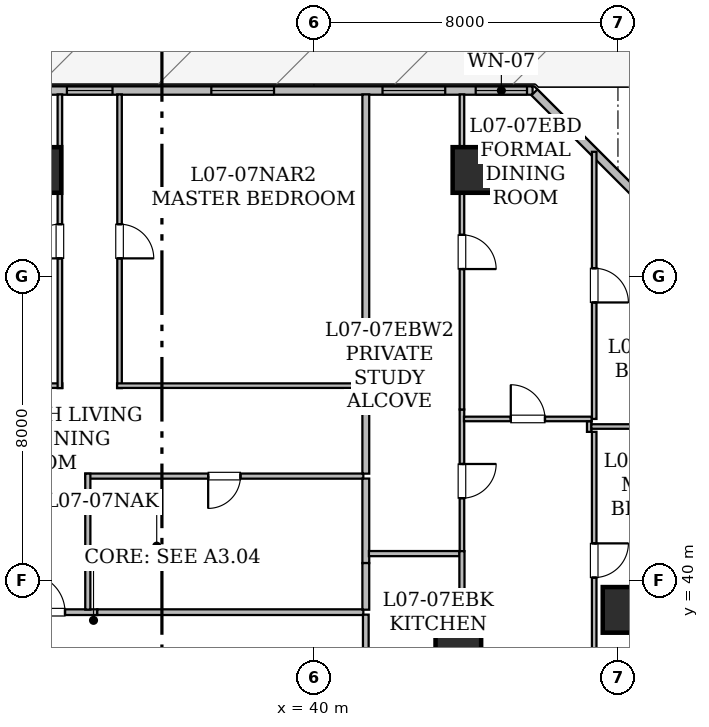
"""IFC4 building model, lengths in metres.
Left out: names, types, materials, properties, quantities, classifications, styles, units other than length and angle.
Written with IfcOpenShell. Run it as: python <this file> out.ifc"""

import sys

from ifc_helpers import new_model, si_unit, direction, frame, frame_2d, origin, origin_2d, place, context, subcontext, project, spatial, rectangle, hollow_rectangle, extrude, element, fill, save


model = new_model("IFC4")
c1 = context("Model", 3, precision=1e-05, world=origin(), true_north=direction((0.0, 1.0)))
c2 = subcontext(c1, "Body", "Model", "MODEL_VIEW")
j1 = project(units=[si_unit("LENGTHUNIT", "METRE"), si_unit("PLANEANGLEUNIT", "RADIAN")], contexts=[c1])
p1 = place(None, origin())
s1 = spatial("IfcSite", under=j1, at=p1, CompositionType="ELEMENT")
p2 = place(p1, origin())
s2 = spatial("IfcBuilding", under=s1, at=p2, CompositionType="ELEMENT")
p3 = place(p2, frame((0.0, 0.0, 33.3)))
s3 = spatial("IfcBuildingStorey", under=s2, at=p3, CompositionType="ELEMENT", Elevation=33.3)
for number, where, z_axis, x_axis in (
    (1, (32.75, 50.8, 0.025), (0.0, 0.0, 1.0), (1.0, 0.0, 0.0)),
    (2, (44.25, 50.8, 0.025), (0.0, 0.0, 1.0), (1.0, 0.0, 0.0)),
    (3, (48.2, 39.225, 0.025), (0.0, 0.0, 1.0), (1.0, 0.0, 0.0)),
    (4, (43.8, 38.2, 0.025), (0.0, 0.0, 1.0), (1.0, 0.0, 0.0)),
):
    element("IfcColumn", number, at=place(p3, frame(where, z_axis=z_axis, x_axis=x_axis)), inside=s3, PredefinedType="COLUMN", context=c2, shape_type="SweptSolid", body=[
        extrude(hollow_rectangle(XDim=1.2, YDim=1.2, WallThickness=0.06, at=origin_2d()), origin(), (0.0, 0.0, 1.0), 3.625),
    ])
p4 = place(p3, frame((8.315, 52.89, 0.0), z_axis=(0.0, 0.0, 1.0), x_axis=(1.0, 0.0, 0.0)))
e5 = element("IfcWall", 5, at=p4, inside=s3, PredefinedType="STANDARD", context=c2, shape_type="SweptSolid", body=[
    extrude(rectangle(XDim=37.439, YDim=0.22, at=frame_2d((18.719, 0.0))), origin(), (0.0, 0.0, 1.0), 3.43),
])
p5 = place(p4, frame((19.779, 0.0, 0.0)))
e6 = element("IfcOpeningElement", 6, at=p5, cuts=e5, PredefinedType="OPENING", context=c2, shape_type="SweptSolid", body=[
    extrude(rectangle(XDim=1.0, YDim=2.15, at=frame_2d((0.5, 1.075))), frame((0.0, 0.12, 0.0), z_axis=(0.0, -1.0, 0.0), x_axis=(1.0, 0.0, 0.0)), (0.0, 0.0, 1.0), 0.24),
])
p6 = place(p4, frame((4.524, 0.0, 0.85)))
e7 = element("IfcOpeningElement", 7, at=p6, cuts=e5, PredefinedType="OPENING", context=c2, shape_type="SweptSolid", body=[
    extrude(rectangle(XDim=1.65, YDim=1.55, at=frame_2d((0.825, 0.775))), frame((0.0, 0.12, 0.0), z_axis=(0.0, -1.0, 0.0), x_axis=(1.0, 0.0, 0.0)), (0.0, 0.0, 1.0), 0.24),
])
p7 = place(p4, frame((16.273, 0.0, 0.85)))
e8 = element("IfcOpeningElement", 8, at=p7, cuts=e5, PredefinedType="OPENING", context=c2, shape_type="SweptSolid", body=[
    extrude(rectangle(XDim=1.65, YDim=1.55, at=frame_2d((0.825, 0.775))), frame((0.0, 0.12, 0.0), z_axis=(0.0, -1.0, 0.0), x_axis=(1.0, 0.0, 0.0)), (0.0, 0.0, 1.0), 0.24),
])
p8 = place(p4, frame((14.285, 0.0, 0.8)))
e9 = element("IfcOpeningElement", 9, at=p8, cuts=e5, PredefinedType="OPENING", context=c2, shape_type="SweptSolid", body=[
    extrude(rectangle(XDim=1.2, YDim=1.5, at=frame_2d((0.6, 0.75))), frame((0.0, 0.12, 0.0), z_axis=(0.0, -1.0, 0.0), x_axis=(1.0, 0.0, 0.0)), (0.0, 0.0, 1.0), 0.24),
])
p9 = place(p4, frame((10.238, 0.0, 0.85)))
e10 = element("IfcOpeningElement", 10, at=p9, cuts=e5, PredefinedType="OPENING", context=c2, shape_type="SweptSolid", body=[
    extrude(rectangle(XDim=1.65, YDim=1.55, at=frame_2d((0.825, 0.775))), frame((0.0, 0.12, 0.0), z_axis=(0.0, -1.0, 0.0), x_axis=(1.0, 0.0, 0.0)), (0.0, 0.0, 1.0), 0.24),
])
p10 = place(p4, frame((25.185, 0.0, 0.8)))
e11 = element("IfcOpeningElement", 11, at=p10, cuts=e5, PredefinedType="OPENING", context=c2, shape_type="SweptSolid", body=[
    extrude(rectangle(XDim=1.2, YDim=1.5, at=frame_2d((0.6, 0.75))), frame((0.0, 0.12, 0.0), z_axis=(0.0, -1.0, 0.0), x_axis=(1.0, 0.0, 0.0)), (0.0, 0.0, 1.0), 0.24),
])
p11 = place(p4, frame((28.985, 0.0, 0.85)))
e12 = element("IfcOpeningElement", 12, at=p11, cuts=e5, PredefinedType="OPENING", context=c2, shape_type="SweptSolid", body=[
    extrude(rectangle(XDim=1.65, YDim=1.55, at=frame_2d((0.825, 0.775))), frame((0.0, 0.12, 0.0), z_axis=(0.0, -1.0, 0.0), x_axis=(1.0, 0.0, 0.0)), (0.0, 0.0, 1.0), 0.24),
])
p12 = place(p4, frame((33.49, 0.0, 0.85)))
e13 = element("IfcOpeningElement", 13, at=p12, cuts=e5, PredefinedType="OPENING", context=c2, shape_type="SweptSolid", body=[
    extrude(rectangle(XDim=1.65, YDim=1.55, at=frame_2d((0.825, 0.775))), frame((0.0, 0.12, 0.0), z_axis=(0.0, -1.0, 0.0), x_axis=(1.0, 0.0, 0.0)), (0.0, 0.0, 1.0), 0.24),
])
p13 = place(p4, frame((35.942, 0.0, 0.85)))
e14 = element("IfcOpeningElement", 14, at=p13, cuts=e5, PredefinedType="OPENING", context=c2, shape_type="SweptSolid", body=[
    extrude(rectangle(XDim=1.35, YDim=1.5, at=frame_2d((0.675, 0.75))), frame((0.0, 0.12, 0.0), z_axis=(0.0, -1.0, 0.0), x_axis=(1.0, 0.0, 0.0)), (0.0, 0.0, 1.0), 0.24),
])
p14 = place(p3, frame((45.802, 52.842, 0.0), z_axis=(0.0, 0.0, 1.0), x_axis=(0.707085666273, -0.70712789547, 0.0)))
e15 = element("IfcWall", 15, at=p14, inside=s3, PredefinedType="STANDARD", context=c2, shape_type="SweptSolid", body=[
    extrude(rectangle(XDim=5.781, YDim=0.22, at=frame_2d((2.891, 0.0))), origin(), (0.0, 0.0, 1.0), 3.43),
])
p15 = place(p3, frame((31.601, 39.165, 0.0), z_axis=(0.0, 0.0, 1.0), x_axis=(1.0, 0.0, 0.0)))
e16 = element("IfcWall", 16, at=p15, inside=s3, PredefinedType="STANDARD", context=c2, shape_type="SweptSolid", body=[
    extrude(rectangle(XDim=2.698, YDim=0.15, at=frame_2d((1.349, 0.0))), origin(), (0.0, 0.0, 1.0), 3.43),
])
p16 = place(p15, frame((0.849, 0.0, 0.0)))
e17 = element("IfcOpeningElement", 17, at=p16, cuts=e16, PredefinedType="OPENING", context=c2, shape_type="SweptSolid", body=[
    extrude(rectangle(XDim=1.0, YDim=2.15, at=frame_2d((0.5, 1.075))), frame((0.0, 0.085, 0.0), z_axis=(0.0, -1.0, 0.0), x_axis=(1.0, 0.0, 0.0)), (0.0, 0.0, 1.0), 0.17),
])
p17 = place(p3, frame((34.299, 39.165, 0.0), z_axis=(0.0, 0.0, 1.0), x_axis=(1.0, 0.0, 0.0)))
e18 = element("IfcWall", 18, at=p17, inside=s3, PredefinedType="STANDARD", context=c2, shape_type="SweptSolid", body=[
    extrude(rectangle(XDim=7.001, YDim=0.15, at=frame_2d((3.5, 0.0))), origin(), (0.0, 0.0, 1.0), 3.43),
])
p18 = place(p3, frame((41.365, 39.1, 0.0), z_axis=(0.0, 0.0, 1.0), x_axis=(0.0, -1.0, 0.0)))
e19 = element("IfcWall", 19, at=p18, inside=s3, PredefinedType="STANDARD", context=c2, shape_type="SweptSolid", body=[
    extrude(rectangle(XDim=3.11, YDim=0.15, at=frame_2d((1.555, 0.0))), origin(), (0.0, 0.0, 1.0), 2.647),
])
p19 = place(p3, frame((41.3, 42.745, 0.0), z_axis=(0.0, 0.0, 1.0), x_axis=(-1.0, 0.0, 0.0)))
e20 = element("IfcWall", 20, at=p19, inside=s3, PredefinedType="PARTITIONING", context=c2, shape_type="SweptSolid", body=[
    extrude(rectangle(XDim=7.315, YDim=0.135, at=frame_2d((3.657, 0.0))), origin(), (0.0, 0.0, 1.0), 2.957),
])
p20 = place(p19, frame((3.233, 0.0, 0.0)))
e21 = element("IfcOpeningElement", 21, at=p20, cuts=e20, PredefinedType="OPENING", context=c2, shape_type="SweptSolid", body=[
    extrude(rectangle(XDim=0.85, YDim=2.1, at=frame_2d((0.425, 1.05))), frame((0.0, 0.077, 0.0), z_axis=(0.0, -1.0, 0.0), x_axis=(1.0, 0.0, 0.0)), (0.0, 0.0, 1.0), 0.155),
])
p21 = place(p3, frame((34.05, 42.81, 0.0), z_axis=(0.0, 0.0, 1.0), x_axis=(0.0, -1.0, 0.0)))
e22 = element("IfcWall", 22, at=p21, inside=s3, PredefinedType="PARTITIONING", context=c2, shape_type="SweptSolid", body=[
    extrude(rectangle(XDim=3.578, YDim=0.135, at=frame_2d((1.789, 0.0))), origin(), (0.0, 0.0, 1.0), 2.957),
])
p22 = place(p3, frame((26.917, 45.125, 0.0), z_axis=(0.0, 0.0, 1.0), x_axis=(1.0, 0.0, 0.0)))
e23 = element("IfcWall", 23, at=p22, inside=s3, PredefinedType="PARTITIONING", context=c2, shape_type="SweptSolid", body=[
    extrude(rectangle(XDim=6.463, YDim=0.12, at=frame_2d((3.231, 0.0))), origin(), (0.0, 0.0, 1.0), 2.647),
])
p23 = place(p3, frame((33.315, 45.06, 0.0), z_axis=(0.0, 0.0, 1.0), x_axis=(0.0, 1.0, 0.0)))
e24 = element("IfcWall", 24, at=p23, inside=s3, PredefinedType="PARTITIONING", context=c2, shape_type="SweptSolid", body=[
    extrude(rectangle(XDim=7.728, YDim=0.12, at=frame_2d((3.864, 0.0))), origin(), (0.0, 0.0, 1.0), 2.803),
])
p24 = place(p23, frame((3.414, 0.0, 0.0)))
e25 = element("IfcOpeningElement", 25, at=p24, cuts=e24, PredefinedType="OPENING", context=c2, shape_type="SweptSolid", body=[
    extrude(rectangle(XDim=0.9, YDim=2.1, at=frame_2d((0.45, 1.05))), frame((0.0, 0.07, 0.0), z_axis=(0.0, -1.0, 0.0), x_axis=(1.0, 0.0, 0.0)), (0.0, 0.0, 1.0), 0.14),
])
p25 = place(p3, frame((34.885, 52.788, 0.0), z_axis=(0.0, 0.0, 1.0), x_axis=(0.0, -1.0, 0.0)))
e26 = element("IfcWall", 26, at=p25, inside=s3, PredefinedType="PARTITIONING", context=c2, shape_type="SweptSolid", body=[
    extrude(rectangle(XDim=7.728, YDim=0.12, at=frame_2d((3.864, 0.0))), origin(), (0.0, 0.0, 1.0), 2.803),
])
p26 = place(p25, frame((3.414, 0.0, 0.0)))
e27 = element("IfcOpeningElement", 27, at=p26, cuts=e26, PredefinedType="OPENING", context=c2, shape_type="SweptSolid", body=[
    extrude(rectangle(XDim=0.9, YDim=2.1, at=frame_2d((0.45, 1.05))), frame((0.0, 0.07, 0.0), z_axis=(0.0, -1.0, 0.0), x_axis=(1.0, 0.0, 0.0)), (0.0, 0.0, 1.0), 0.14),
])
p27 = place(p3, frame((34.82, 45.125, 0.0), z_axis=(0.0, 0.0, 1.0), x_axis=(1.0, 0.0, 0.0)))
e28 = element("IfcWall", 28, at=p27, inside=s3, PredefinedType="PARTITIONING", context=c2, shape_type="SweptSolid", body=[
    extrude(rectangle(XDim=6.48, YDim=0.12, at=frame_2d((3.24, 0.0))), origin(), (0.0, 0.0, 1.0), 3.43),
])
p28 = place(p3, frame((41.365, 45.06, 0.0), z_axis=(0.0, 0.0, 1.0), x_axis=(0.0, -1.0, 0.0)))
e29 = element("IfcWall", 29, at=p28, inside=s3, PredefinedType="STANDARD", context=c2, shape_type="SweptSolid", body=[
    extrude(rectangle(XDim=2.25, YDim=0.18, at=frame_2d((1.125, 0.0))), origin(), (0.0, 0.0, 1.0), 3.43),
])
p29 = place(p3, frame((41.365, 42.68, 0.0), z_axis=(0.0, 0.0, 1.0), x_axis=(0.0, -1.0, 0.0)))
e30 = element("IfcWall", 30, at=p29, inside=s3, PredefinedType="STANDARD", context=c2, shape_type="SweptSolid", body=[
    extrude(rectangle(XDim=2.223, YDim=0.18, at=frame_2d((1.111, 0.0))), origin(), (0.0, 0.0, 1.0), 2.957),
])
p30 = place(p3, frame((41.365, 40.457, 0.0), z_axis=(0.0, 0.0, 1.0), x_axis=(0.0, -1.0, 0.0)))
e31 = element("IfcWall", 31, at=p30, inside=s3, PredefinedType="STANDARD", context=c2, shape_type="SweptSolid", body=[
    extrude(rectangle(XDim=1.227, YDim=0.18, at=frame_2d((0.614, 0.0))), origin(), (0.0, 0.0, 1.0), 3.43),
])
p31 = place(p3, frame((41.365, 52.788, 0.0), z_axis=(0.0, 0.0, 1.0), x_axis=(0.0, -1.0, 0.0)))
e32 = element("IfcWall", 32, at=p31, inside=s3, PredefinedType="STANDARD", context=c2, shape_type="SweptSolid", body=[
    extrude(rectangle(XDim=7.598, YDim=0.18, at=frame_2d((3.799, 0.0))), origin(), (0.0, 0.0, 1.0), 2.803),
])
p32 = place(p3, frame((43.895, 44.498, 0.0), z_axis=(0.0, 0.0, 1.0), x_axis=(0.0, -1.0, 0.0)))
e33 = element("IfcWall", 33, at=p32, inside=s3, PredefinedType="PARTITIONING", context=c2, shape_type="SweptSolid", body=[
    extrude(rectangle(XDim=3.727, YDim=0.12, at=frame_2d((1.864, 0.0))), origin(), (0.0, 0.0, 1.0), 2.647),
])
p33 = place(p32, frame((1.434, 0.0, 0.0)))
e34 = element("IfcOpeningElement", 34, at=p33, cuts=e33, PredefinedType="OPENING", context=c2, shape_type="SweptSolid", body=[
    extrude(rectangle(XDim=0.9, YDim=2.1, at=frame_2d((0.45, 1.05))), frame((0.0, 0.07, 0.0), z_axis=(0.0, -1.0, 0.0), x_axis=(1.0, 0.0, 0.0)), (0.0, 0.0, 1.0), 0.14),
])
p34 = place(p3, frame((43.895, 52.788, 0.0), z_axis=(0.0, 0.0, 1.0), x_axis=(0.0, -1.0, 0.0)))
e35 = element("IfcWall", 35, at=p34, inside=s3, PredefinedType="PARTITIONING", context=c2, shape_type="SweptSolid", body=[
    extrude(rectangle(XDim=8.29, YDim=0.12, at=frame_2d((4.145, 0.0))), origin(), (0.0, 0.0, 1.0), 2.647),
])
p35 = place(p34, frame((3.695, 0.0, 0.0)))
e36 = element("IfcOpeningElement", 36, at=p35, cuts=e35, PredefinedType="OPENING", context=c2, shape_type="SweptSolid", body=[
    extrude(rectangle(XDim=0.9, YDim=2.1, at=frame_2d((0.45, 1.05))), frame((0.0, 0.07, 0.0), z_axis=(0.0, -1.0, 0.0), x_axis=(1.0, 0.0, 0.0)), (0.0, 0.0, 1.0), 0.14),
])
p36 = place(p3, frame((43.83, 40.706, 0.0), z_axis=(0.0, 0.0, 1.0), x_axis=(-1.0, 0.0, 0.0)))
e37 = element("IfcWall", 37, at=p36, inside=s3, PredefinedType="PARTITIONING", context=c2, shape_type="SweptSolid", body=[
    extrude(rectangle(XDim=2.383, YDim=0.135, at=frame_2d((1.191, 0.0))), origin(), (0.0, 0.0, 1.0), 2.647),
])
p37 = place(p3, frame((43.949, 44.249, 0.0), z_axis=(0.0, 0.0, 1.0), x_axis=(1.0, 0.0, 0.0)))
e38 = element("IfcWall", 38, at=p37, inside=s3, PredefinedType="PARTITIONING", context=c2, shape_type="SweptSolid", body=[
    extrude(rectangle(XDim=3.361, YDim=0.12, at=frame_2d((1.681, 0.0))), origin(), (0.0, 0.0, 1.0), 2.647),
])
p38 = place(p37, frame((1.231, 0.0, 0.0)))
e39 = element("IfcOpeningElement", 39, at=p38, cuts=e38, PredefinedType="OPENING", context=c2, shape_type="SweptSolid", body=[
    extrude(rectangle(XDim=0.9, YDim=2.1, at=frame_2d((0.45, 1.05))), frame((0.0, 0.07, 0.0), z_axis=(0.0, -1.0, 0.0), x_axis=(1.0, 0.0, 0.0)), (0.0, 0.0, 1.0), 0.14),
])
p39 = place(p3, frame((47.245, 44.184, 0.0), z_axis=(0.0, 0.0, 1.0), x_axis=(0.0, -1.0, 0.0)))
e40 = element("IfcWall", 40, at=p39, inside=s3, PredefinedType="PARTITIONING", context=c2, shape_type="SweptSolid", body=[
    extrude(rectangle(XDim=0.275, YDim=0.12, at=frame_2d((0.138, 0.0))), origin(), (0.0, 0.0, 1.0), 3.43),
])
p40 = place(p3, frame((43.895, 35.676, 0.0), z_axis=(0.0, 0.0, 1.0), x_axis=(0.0, 1.0, 0.0)))
e41 = element("IfcWall", 41, at=p40, inside=s3, PredefinedType="PARTITIONING", context=c2, shape_type="SweptSolid", body=[
    extrude(rectangle(XDim=5.095, YDim=0.135, at=frame_2d((2.547, 0.0))), origin(), (0.0, 0.0, 1.0), 2.647),
])
p41 = place(p40, frame((0.857, 0.0, 0.0)))
e42 = element("IfcOpeningElement", 42, at=p41, cuts=e41, PredefinedType="OPENING", context=c2, shape_type="SweptSolid", body=[
    extrude(rectangle(XDim=0.85, YDim=2.1, at=frame_2d((0.425, 1.05))), frame((0.0, 0.077, 0.0), z_axis=(0.0, -1.0, 0.0), x_axis=(1.0, 0.0, 0.0)), (0.0, 0.0, 1.0), 0.155),
])
p42 = place(p3, frame((47.375, 43.909, 0.0), z_axis=(0.0, 0.0, 1.0), x_axis=(0.0, -1.0, 0.0)))
e43 = element("IfcWall", 43, at=p42, inside=s3, PredefinedType="PARTITIONING", context=c2, shape_type="SweptSolid", body=[
    extrude(rectangle(XDim=7.246, YDim=0.12, at=frame_2d((3.623, 0.0))), origin(), (0.0, 0.0, 1.0), 2.647),
])
p43 = place(p42, frame((2.934, 0.0, 0.0)))
e44 = element("IfcOpeningElement", 44, at=p43, cuts=e43, PredefinedType="OPENING", context=c2, shape_type="SweptSolid", body=[
    extrude(rectangle(XDim=0.9, YDim=2.1, at=frame_2d((0.45, 1.05))), frame((0.0, 0.07, 0.0), z_axis=(0.0, -1.0, 0.0), x_axis=(1.0, 0.0, 0.0)), (0.0, 0.0, 1.0), 0.14),
])
p44 = place(p3, frame((47.375, 51.278, 0.0), z_axis=(0.0, 0.0, 1.0), x_axis=(0.0, -1.0, 0.0)))
e45 = element("IfcWall", 45, at=p44, inside=s3, PredefinedType="PARTITIONING", context=c2, shape_type="SweptSolid", body=[
    extrude(rectangle(XDim=7.029, YDim=0.12, at=frame_2d((3.515, 0.0))), origin(), (0.0, 0.0, 1.0), 3.43),
])
p45 = place(p44, frame((3.064, 0.0, 0.0)))
e46 = element("IfcOpeningElement", 46, at=p45, cuts=e45, PredefinedType="OPENING", context=c2, shape_type="SweptSolid", body=[
    extrude(rectangle(XDim=0.9, YDim=2.1, at=frame_2d((0.45, 1.05))), frame((0.0, 0.07, 0.0), z_axis=(0.0, -1.0, 0.0), x_axis=(1.0, 0.0, 0.0)), (0.0, 0.0, 1.0), 0.14),
])
p46 = place(p3, frame((47.299, 44.05, 0.0), z_axis=(0.0, 0.0, 1.0), x_axis=(1.0, 0.0, 0.0)))
e47 = element("IfcWall", 47, at=p46, inside=s3, PredefinedType="PARTITIONING", context=c2, shape_type="SweptSolid", body=[
    extrude(rectangle(XDim=2.489, YDim=0.12, at=frame_2d((1.245, 0.0))), origin(), (0.0, 0.0, 1.0), 3.43),
])
p47 = place(p10, origin())
e48 = element("IfcWindow", 48, at=p47, inside=s3, PartitioningType="SINGLE_PANEL", PredefinedType="WINDOW", context=c2, shape_type="SweptSolid", body=[
    extrude(rectangle(XDim=1.2, YDim=1.5, at=frame_2d((0.6, 0.75))), frame((0.0, 0.03, 0.0), z_axis=(0.0, -1.0, 0.0), x_axis=(1.0, 0.0, 0.0)), (0.0, 0.0, 1.0), 0.06),
])
fill(e11, e48)
p48 = place(p11, origin())
e49 = element("IfcWindow", 49, at=p48, inside=s3, PartitioningType="SINGLE_PANEL", PredefinedType="WINDOW", context=c2, shape_type="SweptSolid", body=[
    extrude(rectangle(XDim=1.65, YDim=1.55, at=frame_2d((0.825, 0.775))), frame((0.0, 0.03, 0.0), z_axis=(0.0, -1.0, 0.0), x_axis=(1.0, 0.0, 0.0)), (0.0, 0.0, 1.0), 0.06),
])
fill(e12, e49)
p49 = place(p12, origin())
e50 = element("IfcWindow", 50, at=p49, inside=s3, PartitioningType="SINGLE_PANEL", PredefinedType="WINDOW", context=c2, shape_type="SweptSolid", body=[
    extrude(rectangle(XDim=1.65, YDim=1.55, at=frame_2d((0.825, 0.775))), frame((0.0, 0.03, 0.0), z_axis=(0.0, -1.0, 0.0), x_axis=(1.0, 0.0, 0.0)), (0.0, 0.0, 1.0), 0.06),
])
fill(e13, e50)
p50 = place(p13, origin())
e51 = element("IfcWindow", 51, at=p50, inside=s3, PartitioningType="SINGLE_PANEL", PredefinedType="WINDOW", context=c2, shape_type="SweptSolid", body=[
    extrude(rectangle(XDim=1.35, YDim=1.5, at=frame_2d((0.675, 0.75))), frame((0.0, 0.03, 0.0), z_axis=(0.0, -1.0, 0.0), x_axis=(1.0, 0.0, 0.0)), (0.0, 0.0, 1.0), 0.06),
])
fill(e14, e51)
p51 = place(p16, origin())
e52 = element("IfcDoor", 52, at=p51, inside=s3, OperationType="SINGLE_SWING_LEFT", PredefinedType="DOOR", context=c2, shape_type="SweptSolid", body=[
    extrude(rectangle(XDim=1.0, YDim=2.15, at=frame_2d((0.5, 1.075))), frame((0.0, 0.025, 0.0), z_axis=(0.0, -1.0, 0.0), x_axis=(1.0, 0.0, 0.0)), (0.0, 0.0, 1.0), 0.05),
])
fill(e17, e52)
p52 = place(p20, origin())
e53 = element("IfcDoor", 53, at=p52, inside=s3, OperationType="SINGLE_SWING_RIGHT", PredefinedType="DOOR", context=c2, shape_type="SweptSolid", body=[
    extrude(rectangle(XDim=0.85, YDim=2.1, at=frame_2d((0.425, 1.05))), frame((0.0, 0.025, 0.0), z_axis=(0.0, -1.0, 0.0), x_axis=(1.0, 0.0, 0.0)), (0.0, 0.0, 1.0), 0.05),
])
fill(e21, e53)
p53 = place(p24, origin())
e54 = element("IfcDoor", 54, at=p53, inside=s3, OperationType="SINGLE_SWING_LEFT", PredefinedType="DOOR", context=c2, shape_type="SweptSolid", body=[
    extrude(rectangle(XDim=0.9, YDim=2.1, at=frame_2d((0.45, 1.05))), frame((0.0, 0.025, 0.0), z_axis=(0.0, -1.0, 0.0), x_axis=(1.0, 0.0, 0.0)), (0.0, 0.0, 1.0), 0.05),
])
fill(e25, e54)
p54 = place(p26, origin())
e55 = element("IfcDoor", 55, at=p54, inside=s3, OperationType="SINGLE_SWING_RIGHT", PredefinedType="DOOR", context=c2, shape_type="SweptSolid", body=[
    extrude(rectangle(XDim=0.9, YDim=2.1, at=frame_2d((0.45, 1.05))), frame((0.0, 0.025, 0.0), z_axis=(0.0, -1.0, 0.0), x_axis=(1.0, 0.0, 0.0)), (0.0, 0.0, 1.0), 0.05),
])
fill(e27, e55)
p55 = place(p33, origin())
e56 = element("IfcDoor", 56, at=p55, inside=s3, OperationType="SINGLE_SWING_LEFT", PredefinedType="DOOR", context=c2, shape_type="SweptSolid", body=[
    extrude(rectangle(XDim=0.9, YDim=2.1, at=frame_2d((0.45, 1.05))), frame((0.0, 0.025, 0.0), z_axis=(0.0, -1.0, 0.0), x_axis=(1.0, 0.0, 0.0)), (0.0, 0.0, 1.0), 0.05),
])
fill(e34, e56)
p56 = place(p35, origin())
e57 = element("IfcDoor", 57, at=p56, inside=s3, OperationType="SINGLE_SWING_RIGHT", PredefinedType="DOOR", context=c2, shape_type="SweptSolid", body=[
    extrude(rectangle(XDim=0.9, YDim=2.1, at=frame_2d((0.45, 1.05))), frame((0.0, 0.025, 0.0), z_axis=(0.0, -1.0, 0.0), x_axis=(1.0, 0.0, 0.0)), (0.0, 0.0, 1.0), 0.05),
])
fill(e36, e57)
p57 = place(p38, origin())
e58 = element("IfcDoor", 58, at=p57, inside=s3, OperationType="SINGLE_SWING_LEFT", PredefinedType="DOOR", context=c2, shape_type="SweptSolid", body=[
    extrude(rectangle(XDim=0.9, YDim=2.1, at=frame_2d((0.45, 1.05))), frame((0.0, 0.025, 0.0), z_axis=(0.0, -1.0, 0.0), x_axis=(1.0, 0.0, 0.0)), (0.0, 0.0, 1.0), 0.05),
])
fill(e39, e58)
p58 = place(p43, origin())
e59 = element("IfcDoor", 59, at=p58, inside=s3, OperationType="SINGLE_SWING_LEFT", PredefinedType="DOOR", context=c2, shape_type="SweptSolid", body=[
    extrude(rectangle(XDim=0.9, YDim=2.1, at=frame_2d((0.45, 1.05))), frame((0.0, 0.025, 0.0), z_axis=(0.0, -1.0, 0.0), x_axis=(1.0, 0.0, 0.0)), (0.0, 0.0, 1.0), 0.05),
])
fill(e44, e59)
p59 = place(p45, origin())
e60 = element("IfcDoor", 60, at=p59, inside=s3, OperationType="SINGLE_SWING_RIGHT", PredefinedType="DOOR", context=c2, shape_type="SweptSolid", body=[
    extrude(rectangle(XDim=0.9, YDim=2.1, at=frame_2d((0.45, 1.05))), frame((0.0, 0.025, 0.0), z_axis=(0.0, -1.0, 0.0), x_axis=(1.0, 0.0, 0.0)), (0.0, 0.0, 1.0), 0.05),
])
fill(e46, e60)
save(model, sys.argv[1])
